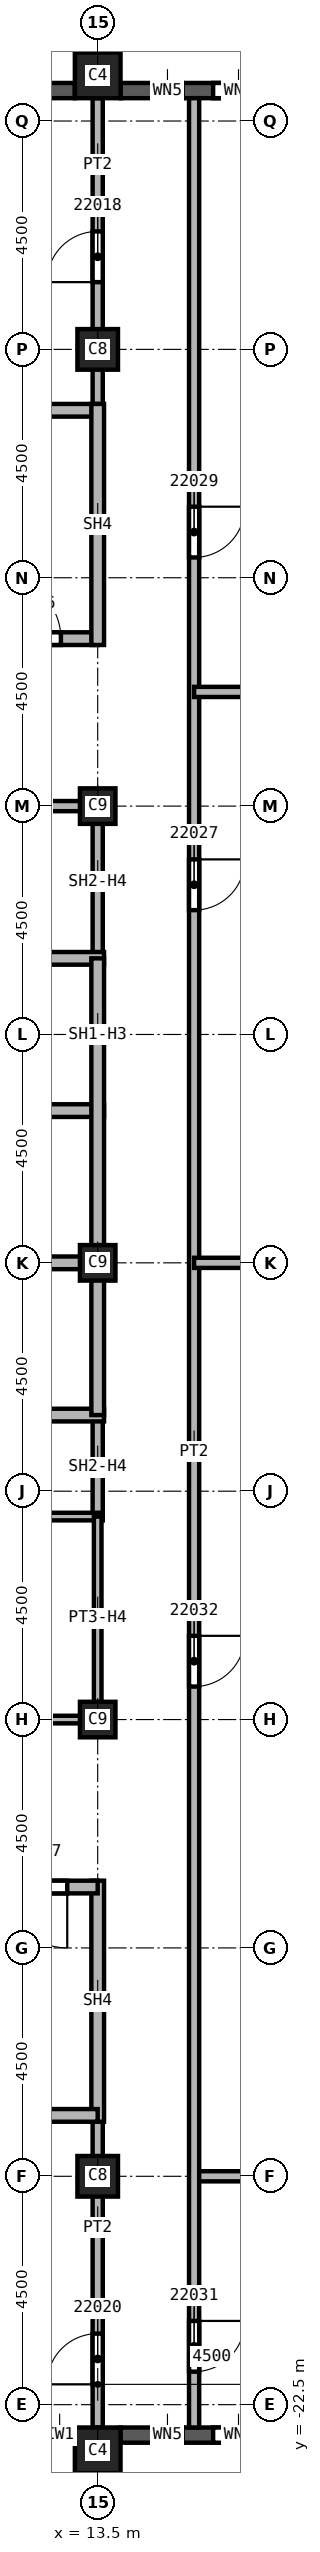
"""IFC4 building model, lengths in metres.
Left out: names, types, materials, properties, quantities, classifications, styles, units other than length and angle.
Written with IfcOpenShell. Run it as: python <this file> out.ifc"""

import sys

from ifc_helpers import new_model, si_unit, direction, frame, frame_2d, origin, origin_2d, place, context, subcontext, project, spatial, rectangle, extrude, element, fill, save


model = new_model("IFC4")
c1 = context("Model", 3, precision=1e-05, world=origin(), true_north=direction((0.0, 1.0)))
c2 = subcontext(c1, "Body", "Model", "MODEL_VIEW")
j1 = project(units=[si_unit("LENGTHUNIT", "METRE"), si_unit("PLANEANGLEUNIT", "RADIAN")], contexts=[c1])
p1 = place(None, origin())
s1 = spatial("IfcSite", under=j1, at=p1, CompositionType="ELEMENT")
p2 = place(p1, origin())
s2 = spatial("IfcBuilding", under=s1, at=p2, CompositionType="ELEMENT")
p3 = place(p2, frame((0.0, 0.0, 312.0)))
s3 = spatial("IfcBuildingStorey", under=s2, at=p3, CompositionType="ELEMENT", Elevation=312.0)
for number, where, z_axis, x_axis in (
    (1, (13.5, 18.0, 0.0), (0.0, 0.0, 1.0), (1.0, 0.0, 0.0)),
    (2, (13.5, -18.0, 0.0), (0.0, 0.0, 1.0), (1.0, 0.0, 0.0)),
):
    element("IfcColumn", number, at=place(p3, frame(where, z_axis=z_axis, x_axis=x_axis)), inside=s3, PredefinedType="COLUMN", context=c2, shape_type="SweptSolid", body=[
        extrude(rectangle(XDim=0.8, YDim=0.8, at=origin_2d()), origin(), (0.0, 0.0, 1.0), 3.74),
    ])
for number, where, z_axis, x_axis in (
    (3, (13.5, 0.0, 0.0), (0.0, 0.0, 1.0), (1.0, 0.0, 0.0)),
    (4, (13.5, 9.0, 0.0), (0.0, 0.0, 1.0), (1.0, 0.0, 0.0)),
    (5, (13.5, -9.0, 0.0), (0.0, 0.0, 1.0), (1.0, 0.0, 0.0)),
):
    element("IfcColumn", number, at=place(p3, frame(where, z_axis=z_axis, x_axis=x_axis)), inside=s3, PredefinedType="COLUMN", context=c2, shape_type="SweptSolid", body=[
        extrude(rectangle(XDim=0.7, YDim=0.7, at=origin_2d()), origin(), (0.0, 0.0, 1.0), 3.74),
    ])
for number, where, z_axis, x_axis in (
    (6, (13.5, 23.4, 0.0), (0.0, 0.0, 1.0), (1.0, 0.0, 0.0)),
    (7, (13.5, -23.4, 0.0), (0.0, 0.0, 1.0), (1.0, 0.0, 0.0)),
):
    element("IfcColumn", number, at=place(p3, frame(where, z_axis=z_axis, x_axis=x_axis)), inside=s3, PredefinedType="COLUMN", context=c2, shape_type="SweptSolid", body=[
        extrude(rectangle(XDim=0.9, YDim=0.9, at=origin_2d()), origin(), (0.0, 0.0, 1.0), 3.74),
    ])
p4 = place(p3, frame((9.45, -23.1, 0.0), z_axis=(0.0, 0.0, 1.0), x_axis=(1.0, 0.0, 0.0)))
e8 = element("IfcWall", 8, at=p4, inside=s3, PredefinedType="SOLIDWALL", context=c2, shape_type="SweptSolid", body=[
    extrude(rectangle(XDim=3.6, YDim=0.3, at=frame_2d((1.8, 0.0))), origin(), (0.0, 0.0, 1.0), 3.14),
])
p5 = place(p4, frame((0.6, 0.0, 0.8)))
e9 = element("IfcOpeningElement", 9, at=p5, cuts=e8, PredefinedType="OPENING", context=c2, shape_type="SweptSolid", body=[
    extrude(rectangle(XDim=2.4, YDim=1.95, at=frame_2d((1.2, 0.975))), frame((0.0, 0.15, 0.0), z_axis=(0.0, -1.0, 0.0), x_axis=(1.0, 0.0, 0.0)), (0.0, 0.0, 1.0), 0.3),
])
p6 = place(p3, frame((13.95, -23.1, 0.0), z_axis=(0.0, 0.0, 1.0), x_axis=(1.0, 0.0, 0.0)))
e10 = element("IfcWall", 10, at=p6, inside=s3, PredefinedType="SOLIDWALL", context=c2, shape_type="SweptSolid", body=[
    extrude(rectangle(XDim=3.6, YDim=0.3, at=frame_2d((1.8, 0.0))), origin(), (0.0, 0.0, 1.0), 3.14),
])
p7 = place(p6, frame((0.625, 0.0, 0.8)))
e11 = element("IfcOpeningElement", 11, at=p7, cuts=e10, PredefinedType="OPENING", context=c2, shape_type="SweptSolid", body=[
    extrude(rectangle(XDim=0.6, YDim=1.95, at=frame_2d((0.3, 0.975))), frame((0.0, 0.15, 0.0), z_axis=(0.0, -1.0, 0.0), x_axis=(1.0, 0.0, 0.0)), (0.0, 0.0, 1.0), 0.3),
])
p8 = place(p6, frame((1.825, 0.0, 0.8)))
e12 = element("IfcOpeningElement", 12, at=p8, cuts=e10, PredefinedType="OPENING", context=c2, shape_type="SweptSolid", body=[
    extrude(rectangle(XDim=1.0, YDim=1.95, at=frame_2d((0.5, 0.975))), frame((0.0, 0.15, 0.0), z_axis=(0.0, -1.0, 0.0), x_axis=(1.0, 0.0, 0.0)), (0.0, 0.0, 1.0), 0.3),
])
p9 = place(p3, frame((17.55, 23.1, 0.0), z_axis=(0.0, 0.0, 1.0), x_axis=(-1.0, 0.0, 0.0)))
e13 = element("IfcWall", 13, at=p9, inside=s3, PredefinedType="SOLIDWALL", context=c2, shape_type="SweptSolid", body=[
    extrude(rectangle(XDim=3.6, YDim=0.3, at=frame_2d((1.8, 0.0))), origin(), (0.0, 0.0, 1.0), 3.14),
])
p10 = place(p9, frame((0.775, 0.0, 0.8)))
e14 = element("IfcOpeningElement", 14, at=p10, cuts=e13, PredefinedType="OPENING", context=c2, shape_type="SweptSolid", body=[
    extrude(rectangle(XDim=1.0, YDim=1.95, at=frame_2d((0.5, 0.975))), frame((0.0, 0.15, 0.0), z_axis=(0.0, -1.0, 0.0), x_axis=(1.0, 0.0, 0.0)), (0.0, 0.0, 1.0), 0.3),
])
p11 = place(p9, frame((2.375, 0.0, 0.8)))
e15 = element("IfcOpeningElement", 15, at=p11, cuts=e13, PredefinedType="OPENING", context=c2, shape_type="SweptSolid", body=[
    extrude(rectangle(XDim=0.6, YDim=1.95, at=frame_2d((0.3, 0.975))), frame((0.0, 0.15, 0.0), z_axis=(0.0, -1.0, 0.0), x_axis=(1.0, 0.0, 0.0)), (0.0, 0.0, 1.0), 0.3),
])
p12 = place(p3, frame((13.05, 23.1, 0.0), z_axis=(0.0, 0.0, 1.0), x_axis=(-1.0, 0.0, 0.0)))
e16 = element("IfcWall", 16, at=p12, inside=s3, PredefinedType="SOLIDWALL", context=c2, shape_type="SweptSolid", body=[
    extrude(rectangle(XDim=3.6, YDim=0.3, at=frame_2d((1.8, 0.0))), origin(), (0.0, 0.0, 1.0), 3.14),
])
p13 = place(p12, frame((0.6, 0.0, 0.8)))
e17 = element("IfcOpeningElement", 17, at=p13, cuts=e16, PredefinedType="OPENING", context=c2, shape_type="SweptSolid", body=[
    extrude(rectangle(XDim=2.4, YDim=1.95, at=frame_2d((1.2, 0.975))), frame((0.0, 0.15, 0.0), z_axis=(0.0, -1.0, 0.0), x_axis=(1.0, 0.0, 0.0)), (0.0, 0.0, 1.0), 0.3),
])
p14 = place(p3, frame((13.5, -22.95, 0.0), z_axis=(0.0, 0.0, 1.0), x_axis=(0.0, 1.0, 0.0)))
e18 = element("IfcWall", 18, at=p14, inside=s3, PredefinedType="PARTITIONING", context=c2, shape_type="SweptSolid", body=[
    extrude(rectangle(XDim=6.275, YDim=0.2, at=frame_2d((3.137, 0.0))), origin(), (0.0, 0.0, 1.0), 3.74),
])
p15 = place(p14, frame((0.85, 0.0, 0.0)))
e19 = element("IfcOpeningElement", 19, at=p15, cuts=e18, PredefinedType="OPENING", context=c2, shape_type="SweptSolid", body=[
    extrude(rectangle(XDim=1.0, YDim=2.1, at=frame_2d((0.5, 1.05))), frame((0.0, 0.1, 0.0), z_axis=(0.0, -1.0, 0.0), x_axis=(1.0, 0.0, 0.0)), (0.0, 0.0, 1.0), 0.2),
])
p16 = place(p3, frame((13.5, 16.675, 0.0), z_axis=(0.0, 0.0, 1.0), x_axis=(0.0, 1.0, 0.0)))
e20 = element("IfcWall", 20, at=p16, inside=s3, PredefinedType="PARTITIONING", context=c2, shape_type="SweptSolid", body=[
    extrude(rectangle(XDim=6.275, YDim=0.2, at=frame_2d((3.137, 0.0))), origin(), (0.0, 0.0, 1.0), 3.74),
])
p17 = place(p16, frame((2.65, 0.0, 0.0)))
e21 = element("IfcOpeningElement", 21, at=p17, cuts=e20, PredefinedType="OPENING", context=c2, shape_type="SweptSolid", body=[
    extrude(rectangle(XDim=1.0, YDim=2.1, at=frame_2d((0.5, 1.05))), frame((0.0, 0.1, 0.0), z_axis=(0.0, -1.0, 0.0), x_axis=(1.0, 0.0, 0.0)), (0.0, 0.0, 1.0), 0.2),
])
p18 = place(p3, frame((15.4, -18.0, 0.0), z_axis=(0.0, 0.0, 1.0), x_axis=(1.0, 0.0, 0.0)))
e22 = element("IfcWall", 22, at=p18, inside=s3, PredefinedType="PARTITIONING", context=c2, shape_type="SweptSolid", body=[
    extrude(rectangle(XDim=5.25, YDim=0.2, at=frame_2d((2.625, 0.0))), origin(), (0.0, 0.0, 1.0), 3.74),
])
p19 = place(p3, frame((15.4, 22.95, 0.0), z_axis=(0.0, 0.0, 1.0), x_axis=(0.0, -1.0, 0.0)))
e23 = element("IfcWall", 23, at=p19, inside=s3, PredefinedType="PARTITIONING", context=c2, shape_type="SweptSolid", body=[
    extrude(rectangle(XDim=45.9, YDim=0.2, at=frame_2d((22.95, 0.0))), origin(), (0.0, 0.0, 1.0), 3.74),
])
p20 = place(p19, frame((15.0, 0.0, 0.0)))
e24 = element("IfcOpeningElement", 24, at=p20, cuts=e23, PredefinedType="OPENING", context=c2, shape_type="SweptSolid", body=[
    extrude(rectangle(XDim=1.0, YDim=2.1, at=frame_2d((0.5, 1.05))), frame((0.0, 0.1, 0.0), z_axis=(0.0, -1.0, 0.0), x_axis=(1.0, 0.0, 0.0)), (0.0, 0.0, 1.0), 0.2),
])
p21 = place(p19, frame((8.05, 0.0, 0.0)))
e25 = element("IfcOpeningElement", 25, at=p21, cuts=e23, PredefinedType="OPENING", context=c2, shape_type="SweptSolid", body=[
    extrude(rectangle(XDim=1.0, YDim=2.1, at=frame_2d((0.5, 1.05))), frame((0.0, 0.1, 0.0), z_axis=(0.0, -1.0, 0.0), x_axis=(1.0, 0.0, 0.0)), (0.0, 0.0, 1.0), 0.2),
])
p22 = place(p19, frame((43.8, 0.0, 0.0)))
e26 = element("IfcOpeningElement", 26, at=p22, cuts=e23, PredefinedType="OPENING", context=c2, shape_type="SweptSolid", body=[
    extrude(rectangle(XDim=1.0, YDim=2.1, at=frame_2d((0.5, 1.05))), frame((0.0, 0.1, 0.0), z_axis=(0.0, -1.0, 0.0), x_axis=(1.0, 0.0, 0.0)), (0.0, 0.0, 1.0), 0.2),
])
p23 = place(p19, frame((30.3, 0.0, 0.0)))
e27 = element("IfcOpeningElement", 27, at=p23, cuts=e23, PredefinedType="OPENING", context=c2, shape_type="SweptSolid", body=[
    extrude(rectangle(XDim=1.0, YDim=2.1, at=frame_2d((0.5, 1.05))), frame((0.0, 0.1, 0.0), z_axis=(0.0, -1.0, 0.0), x_axis=(1.0, 0.0, 0.0)), (0.0, 0.0, 1.0), 0.2),
])
for number, where, z_axis, x_axis in (
    (28, (15.4, 11.25, 0.0), (0.0, 0.0, 1.0), (1.0, 0.0, 0.0)),
    (29, (26.55, 0.0, 0.0), (0.0, 0.0, 1.0), (-1.0, 0.0, 0.0)),
):
    element("IfcWall", number, at=place(p3, frame(where, z_axis=z_axis, x_axis=x_axis)), inside=s3, PredefinedType="PARTITIONING", context=c2, shape_type="SweptSolid", body=[
        extrude(rectangle(XDim=11.15, YDim=0.2, at=frame_2d((5.575, 0.0))), origin(), (0.0, 0.0, 1.0), 3.74),
    ])
p24 = place(p3, frame((10.5, 9.0, 0.0), z_axis=(0.0, 0.0, 1.0), x_axis=(1.0, 0.0, 0.0)))
e30 = element("IfcWall", 30, at=p24, inside=s3, PredefinedType="SOLIDWALL", context=c2, shape_type="SweptSolid", body=[
    extrude(rectangle(XDim=3.0, YDim=0.2, at=frame_2d((1.5, 0.0))), origin(), (0.0, 0.0, 1.0), 3.062),
])
p25 = place(p3, frame((13.5, -3.0, 0.0), z_axis=(0.0, 0.0, 1.0), x_axis=(0.0, -1.0, 0.0)))
e31 = element("IfcWall", 31, at=p25, inside=s3, PredefinedType="SOLIDWALL", context=c2, shape_type="SweptSolid", body=[
    extrude(rectangle(XDim=2.0, YDim=0.2, at=frame_2d((1.0, 0.0))), origin(), (0.0, 0.0, 1.0), 3.062),
])
p26 = place(p3, frame((13.5, 9.1, 0.0), z_axis=(0.0, 0.0, 1.0), x_axis=(0.0, -1.0, 0.0)))
e32 = element("IfcWall", 32, at=p26, inside=s3, PredefinedType="SOLIDWALL", context=c2, shape_type="SweptSolid", body=[
    extrude(rectangle(XDim=3.1, YDim=0.2, at=frame_2d((1.55, 0.0))), origin(), (0.0, 0.0, 1.0), 3.062),
])
p27 = place(p3, frame((7.5, -3.0, 0.0), z_axis=(0.0, 0.0, 1.0), x_axis=(1.0, 0.0, 0.0)))
e33 = element("IfcWall", 33, at=p27, inside=s3, PredefinedType="SOLIDWALL", context=c2, shape_type="SweptSolid", body=[
    extrude(rectangle(XDim=6.125, YDim=0.25, at=frame_2d((3.062, 0.0))), origin(), (0.0, 0.0, 1.0), 3.74),
])
p28 = place(p27, frame((1.75, 0.0, 0.0)))
e34 = element("IfcOpeningElement", 34, at=p28, cuts=e33, PredefinedType="OPENING", context=c2, shape_type="SweptSolid", body=[
    extrude(rectangle(XDim=1.1, YDim=2.1, at=frame_2d((0.55, 1.05))), frame((0.0, 0.125, 0.0), z_axis=(0.0, -1.0, 0.0), x_axis=(1.0, 0.0, 0.0)), (0.0, 0.0, 1.0), 0.25),
])
p29 = place(p3, frame((7.5, 3.0, 0.0), z_axis=(0.0, 0.0, 1.0), x_axis=(1.0, 0.0, 0.0)))
e35 = element("IfcWall", 35, at=p29, inside=s3, PredefinedType="SOLIDWALL", context=c2, shape_type="SweptSolid", body=[
    extrude(rectangle(XDim=6.125, YDim=0.25, at=frame_2d((3.062, 0.0))), origin(), (0.0, 0.0, 1.0), 3.74),
])
p30 = place(p29, frame((1.75, 0.0, 0.0)))
e36 = element("IfcOpeningElement", 36, at=p30, cuts=e35, PredefinedType="OPENING", context=c2, shape_type="SweptSolid", body=[
    extrude(rectangle(XDim=1.1, YDim=2.1, at=frame_2d((0.55, 1.05))), frame((0.0, 0.125, 0.0), z_axis=(0.0, -1.0, 0.0), x_axis=(1.0, 0.0, 0.0)), (0.0, 0.0, 1.0), 0.25),
])
for number, where, z_axis, x_axis in (
    (37, (10.5, 0.0, 0.0), (0.0, 0.0, 1.0), (1.0, 0.0, 0.0)),
    (38, (10.5, 6.0, 0.0), (0.0, 0.0, 1.0), (1.0, 0.0, 0.0)),
):
    element("IfcWall", number, at=place(p3, frame(where, z_axis=z_axis, x_axis=x_axis)), inside=s3, PredefinedType="SOLIDWALL", context=c2, shape_type="SweptSolid", body=[
        extrude(rectangle(XDim=3.125, YDim=0.25, at=frame_2d((1.562, 0.0))), origin(), (0.0, 0.0, 1.0), 3.74),
    ])
p31 = place(p3, frame((13.5, 6.0, 0.0), z_axis=(0.0, 0.0, 1.0), x_axis=(0.0, -1.0, 0.0)))
e39 = element("IfcWall", 39, at=p31, inside=s3, PredefinedType="SOLIDWALL", context=c2, shape_type="SweptSolid", body=[
    extrude(rectangle(XDim=9.0, YDim=0.25, at=frame_2d((4.5, 0.0))), origin(), (0.0, 0.0, 1.0), 3.062),
])
p32 = place(p3, frame((4.375, 12.3, 0.0), z_axis=(0.0, 0.0, 1.0), x_axis=(1.0, 0.0, 0.0)))
e40 = element("IfcWall", 40, at=p32, inside=s3, PredefinedType="SOLIDWALL", context=c2, shape_type="SweptSolid", body=[
    extrude(rectangle(XDim=9.125, YDim=0.25, at=frame_2d((4.562, 0.0))), origin(), (0.0, 0.0, 1.0), 3.74),
])
p33 = place(p32, frame((7.2, 0.0, 0.0)))
e41 = element("IfcOpeningElement", 41, at=p33, cuts=e40, PredefinedType="OPENING", context=c2, shape_type="SweptSolid", body=[
    extrude(rectangle(XDim=1.2, YDim=2.1, at=frame_2d((0.6, 1.05))), frame((0.0, 0.125, 0.0), z_axis=(0.0, -1.0, 0.0), x_axis=(1.0, 0.0, 0.0)), (0.0, 0.0, 1.0), 0.25),
])
p34 = place(p3, frame((4.375, 16.8, 0.0), z_axis=(0.0, 0.0, 1.0), x_axis=(1.0, 0.0, 0.0)))
e42 = element("IfcWall", 42, at=p34, inside=s3, PredefinedType="SOLIDWALL", context=c2, shape_type="SweptSolid", body=[
    extrude(rectangle(XDim=9.125, YDim=0.25, at=frame_2d((4.562, 0.0))), origin(), (0.0, 0.0, 1.0), 3.74),
])
p35 = place(p3, frame((13.5, -16.925, 0.0), z_axis=(0.0, 0.0, 1.0), x_axis=(0.0, 1.0, 0.0)))
e43 = element("IfcWall", 43, at=p35, inside=s3, PredefinedType="SOLIDWALL", context=c2, shape_type="SweptSolid", body=[
    extrude(rectangle(XDim=4.75, YDim=0.25, at=frame_2d((2.375, 0.0))), origin(), (0.0, 0.0, 1.0), 3.74),
])
p36 = place(p3, frame((13.5, -16.8, 0.0), z_axis=(0.0, 0.0, 1.0), x_axis=(-1.0, 0.0, 0.0)))
e44 = element("IfcWall", 44, at=p36, inside=s3, PredefinedType="SOLIDWALL", context=c2, shape_type="SweptSolid", body=[
    extrude(rectangle(XDim=9.125, YDim=0.25, at=frame_2d((4.562, 0.0))), origin(), (0.0, 0.0, 1.0), 3.74),
])
p37 = place(p3, frame((13.5, -12.3, 0.0), z_axis=(0.0, 0.0, 1.0), x_axis=(-1.0, 0.0, 0.0)))
e45 = element("IfcWall", 45, at=p37, inside=s3, PredefinedType="SOLIDWALL", context=c2, shape_type="SweptSolid", body=[
    extrude(rectangle(XDim=9.125, YDim=0.25, at=frame_2d((4.562, 0.0))), origin(), (0.0, 0.0, 1.0), 3.74),
])
p38 = place(p37, frame((0.6, 0.0, 0.0)))
e46 = element("IfcOpeningElement", 46, at=p38, cuts=e45, PredefinedType="OPENING", context=c2, shape_type="SweptSolid", body=[
    extrude(rectangle(XDim=1.2, YDim=2.1, at=frame_2d((0.6, 1.05))), frame((0.0, 0.125, 0.0), z_axis=(0.0, -1.0, 0.0), x_axis=(1.0, 0.0, 0.0)), (0.0, 0.0, 1.0), 0.25),
])
p39 = place(p3, frame((13.5, 12.175, 0.0), z_axis=(0.0, 0.0, 1.0), x_axis=(0.0, 1.0, 0.0)))
e47 = element("IfcWall", 47, at=p39, inside=s3, PredefinedType="SOLIDWALL", context=c2, shape_type="SweptSolid", body=[
    extrude(rectangle(XDim=4.75, YDim=0.25, at=frame_2d((2.375, 0.0))), origin(), (0.0, 0.0, 1.0), 3.74),
])
p40 = place(p3, frame((10.5, -5.0, 0.0), z_axis=(0.0, 0.0, 1.0), x_axis=(1.0, 0.0, 0.0)))
e48 = element("IfcWall", 48, at=p40, inside=s3, PredefinedType="PARTITIONING", context=c2, shape_type="SweptSolid", body=[
    extrude(rectangle(XDim=3.1, YDim=0.15, at=frame_2d((1.55, 0.0))), origin(), (0.0, 0.0, 1.0), 3.74),
])
p41 = place(p3, frame((13.5, -9.0, 0.0), z_axis=(0.0, 0.0, 1.0), x_axis=(-1.0, 0.0, 0.0)))
e49 = element("IfcWall", 49, at=p41, inside=s3, PredefinedType="PARTITIONING", context=c2, shape_type="SweptSolid", body=[
    extrude(rectangle(XDim=3.0, YDim=0.15, at=frame_2d((1.5, 0.0))), origin(), (0.0, 0.0, 1.0), 3.062),
])
p42 = place(p3, frame((13.5, -5.0, 0.0), z_axis=(0.0, 0.0, 1.0), x_axis=(0.0, -1.0, 0.0)))
e50 = element("IfcWall", 50, at=p42, inside=s3, PredefinedType="PARTITIONING", context=c2, shape_type="SweptSolid", body=[
    extrude(rectangle(XDim=4.075, YDim=0.15, at=frame_2d((2.038, 0.0))), origin(), (0.0, 0.0, 1.0), 3.062),
])
p43 = place(p33, origin())
e51 = element("IfcDoor", 51, at=p43, inside=s3, OperationType="SINGLE_SWING_LEFT", PredefinedType="DOOR", context=c2, shape_type="SweptSolid", body=[
    extrude(rectangle(XDim=1.2, YDim=2.1, at=frame_2d((0.6, 1.05))), frame((0.0, 0.025, 0.0), z_axis=(0.0, -1.0, 0.0), x_axis=(1.0, 0.0, 0.0)), (0.0, 0.0, 1.0), 0.05),
])
fill(e41, e51)
p44 = place(p38, origin())
e52 = element("IfcDoor", 52, at=p44, inside=s3, OperationType="SINGLE_SWING_RIGHT", PredefinedType="DOOR", context=c2, shape_type="SweptSolid", body=[
    extrude(rectangle(XDim=1.2, YDim=2.1, at=frame_2d((0.6, 1.05))), frame((0.0, 0.025, 0.0), z_axis=(0.0, -1.0, 0.0), x_axis=(1.0, 0.0, 0.0)), (0.0, 0.0, 1.0), 0.05),
])
fill(e46, e52)
p45 = place(p17, origin())
e53 = element("IfcDoor", 53, at=p45, inside=s3, OperationType="SINGLE_SWING_LEFT", PredefinedType="DOOR", context=c2, shape_type="SweptSolid", body=[
    extrude(rectangle(XDim=1.0, YDim=2.1, at=frame_2d((0.5, 1.05))), frame((0.0, 0.025, 0.0), z_axis=(0.0, -1.0, 0.0), x_axis=(1.0, 0.0, 0.0)), (0.0, 0.0, 1.0), 0.05),
])
fill(e21, e53)
p46 = place(p15, origin())
e54 = element("IfcDoor", 54, at=p46, inside=s3, OperationType="SINGLE_SWING_LEFT", PredefinedType="DOOR", context=c2, shape_type="SweptSolid", body=[
    extrude(rectangle(XDim=1.0, YDim=2.1, at=frame_2d((0.5, 1.05))), frame((0.0, 0.025, 0.0), z_axis=(0.0, -1.0, 0.0), x_axis=(1.0, 0.0, 0.0)), (0.0, 0.0, 1.0), 0.05),
])
fill(e19, e54)
p47 = place(p20, origin())
e55 = element("IfcDoor", 55, at=p47, inside=s3, OperationType="SINGLE_SWING_RIGHT", PredefinedType="DOOR", context=c2, shape_type="SweptSolid", body=[
    extrude(rectangle(XDim=1.0, YDim=2.1, at=frame_2d((0.5, 1.05))), frame((0.0, 0.025, 0.0), z_axis=(0.0, -1.0, 0.0), x_axis=(1.0, 0.0, 0.0)), (0.0, 0.0, 1.0), 0.05),
])
fill(e24, e55)
p48 = place(p21, origin())
e56 = element("IfcDoor", 56, at=p48, inside=s3, OperationType="SINGLE_SWING_RIGHT", PredefinedType="DOOR", context=c2, shape_type="SweptSolid", body=[
    extrude(rectangle(XDim=1.0, YDim=2.1, at=frame_2d((0.5, 1.05))), frame((0.0, 0.025, 0.0), z_axis=(0.0, -1.0, 0.0), x_axis=(1.0, 0.0, 0.0)), (0.0, 0.0, 1.0), 0.05),
])
fill(e25, e56)
p49 = place(p22, origin())
e57 = element("IfcDoor", 57, at=p49, inside=s3, OperationType="SINGLE_SWING_RIGHT", PredefinedType="DOOR", context=c2, shape_type="SweptSolid", body=[
    extrude(rectangle(XDim=1.0, YDim=2.1, at=frame_2d((0.5, 1.05))), frame((0.0, 0.025, 0.0), z_axis=(0.0, -1.0, 0.0), x_axis=(1.0, 0.0, 0.0)), (0.0, 0.0, 1.0), 0.05),
])
fill(e26, e57)
p50 = place(p23, origin())
e58 = element("IfcDoor", 58, at=p50, inside=s3, OperationType="SINGLE_SWING_LEFT", PredefinedType="DOOR", context=c2, shape_type="SweptSolid", body=[
    extrude(rectangle(XDim=1.0, YDim=2.1, at=frame_2d((0.5, 1.05))), frame((0.0, 0.025, 0.0), z_axis=(0.0, -1.0, 0.0), x_axis=(1.0, 0.0, 0.0)), (0.0, 0.0, 1.0), 0.05),
])
fill(e27, e58)
p51 = place(p7, origin())
e59 = element("IfcWindow", 59, at=p51, inside=s3, PartitioningType="SINGLE_PANEL", PredefinedType="WINDOW", context=c2, shape_type="SweptSolid", body=[
    extrude(rectangle(XDim=0.6, YDim=1.95, at=frame_2d((0.3, 0.975))), frame((0.0, 0.03, 0.0), z_axis=(0.0, -1.0, 0.0), x_axis=(1.0, 0.0, 0.0)), (0.0, 0.0, 1.0), 0.06),
])
fill(e11, e59)
p52 = place(p8, origin())
e60 = element("IfcWindow", 60, at=p52, inside=s3, PartitioningType="SINGLE_PANEL", PredefinedType="WINDOW", context=c2, shape_type="SweptSolid", body=[
    extrude(rectangle(XDim=1.0, YDim=1.95, at=frame_2d((0.5, 0.975))), frame((0.0, 0.03, 0.0), z_axis=(0.0, -1.0, 0.0), x_axis=(1.0, 0.0, 0.0)), (0.0, 0.0, 1.0), 0.06),
])
fill(e12, e60)
p53 = place(p10, origin())
e61 = element("IfcWindow", 61, at=p53, inside=s3, PartitioningType="SINGLE_PANEL", PredefinedType="WINDOW", context=c2, shape_type="SweptSolid", body=[
    extrude(rectangle(XDim=1.0, YDim=1.95, at=frame_2d((0.5, 0.975))), frame((0.0, 0.03, 0.0), z_axis=(0.0, -1.0, 0.0), x_axis=(1.0, 0.0, 0.0)), (0.0, 0.0, 1.0), 0.06),
])
fill(e14, e61)
p54 = place(p11, origin())
e62 = element("IfcWindow", 62, at=p54, inside=s3, PartitioningType="SINGLE_PANEL", PredefinedType="WINDOW", context=c2, shape_type="SweptSolid", body=[
    extrude(rectangle(XDim=0.6, YDim=1.95, at=frame_2d((0.3, 0.975))), frame((0.0, 0.03, 0.0), z_axis=(0.0, -1.0, 0.0), x_axis=(1.0, 0.0, 0.0)), (0.0, 0.0, 1.0), 0.06),
])
fill(e15, e62)
save(model, sys.argv[1])
